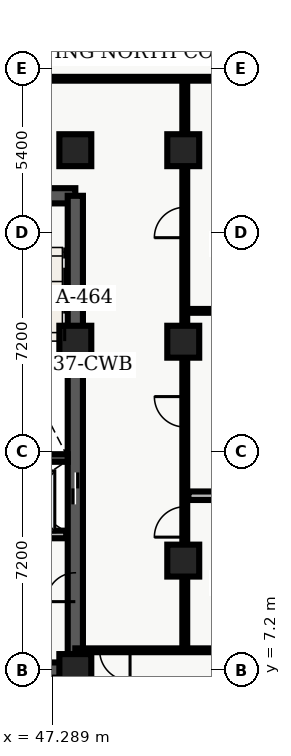
"""IFC4 building model, lengths in metres.
Left out: names, types, materials, properties, quantities, classifications, styles, units other than length and angle.
Written with IfcOpenShell. Run it as: python <this file> out.ifc"""

import sys

from ifc_helpers import new_model, entity, si_unit, converted_unit, direction, frame, origin_with_axes, origin_2d_with_axis, place, context, subcontext, project, spatial, polyline, rectangle, outline, extrude, element, fill, save


model = new_model("IFC4")
c1 = context("Model", 3, precision=1e-05, world=origin_with_axes(), true_north=direction((0.0, 1.0)))
c2 = subcontext(c1, "Body", "Model", "MODEL_VIEW")
j1 = project(units=[si_unit("LENGTHUNIT", "METRE"), converted_unit("PLANEANGLEUNIT", "DEGREE", entity("IfcPlaneAngleMeasure", 0.017), si_unit("PLANEANGLEUNIT", "RADIAN"), dimensions=[0, 0, 0, 0, 0, 0, 0])], contexts=[c1])
p1 = place(None, origin_with_axes())
s1 = spatial("IfcSite", under=j1, at=p1, CompositionType="ELEMENT")
p2 = place(p1, origin_with_axes())
s2 = spatial("IfcBuilding", under=s1, at=p2, CompositionType="ELEMENT")
p3 = place(p2, frame((0.0, 0.0, 152.4), z_axis=(0.0, 0.0, 1.0), x_axis=(1.0, 0.0, 0.0)))
s3 = spatial("IfcBuildingStorey", under=s2, at=p3, CompositionType="ELEMENT", Elevation=152.4)
p4 = place(p3, frame((40.2, 7.2, 0.0), z_axis=(0.0, 0.0, 1.0), x_axis=(1.0, 0.0, 0.0)))
e1 = element("IfcWall", 1, at=p4, inside=s3, PredefinedType="SHEAR", context=c2, shape_type="SweptSolid", body=[
    extrude(outline(polyline([(0.0, -0.25), (7.85, -0.25), (7.85, 0.25), (0.0, 0.25), (0.0, -0.25)])), origin_with_axes(), (0.0, 0.0, 1.0), 3.66),
])
p5 = place(p4, frame((2.175, 0.0, 0.0), z_axis=(0.0, 0.0, 1.0), x_axis=(1.0, 0.0, 0.0)))
e2 = element("IfcOpeningElement", 2, at=p5, cuts=e1, PredefinedType="OPENING", context=c2, shape_type="SweptSolid", body=[
    extrude(rectangle(XDim=1.05, YDim=0.52, at=origin_2d_with_axis()), origin_with_axes(), (0.0, 0.0, 1.0), 2.15),
])
p6 = place(p3, frame((40.2, 22.8, 0.0), z_axis=(0.0, 0.0, 1.0), x_axis=(1.0, 0.0, 0.0)))
e3 = element("IfcWall", 3, at=p6, inside=s3, PredefinedType="SHEAR", context=c2, shape_type="SweptSolid", body=[
    extrude(outline(polyline([(0.0, -0.25), (7.85, -0.25), (7.85, 0.25), (0.0, 0.25), (0.0, -0.25)])), origin_with_axes(), (0.0, 0.0, 1.0), 3.66),
])
p7 = place(p6, frame((5.775, 0.0, 0.0), z_axis=(0.0, 0.0, 1.0), x_axis=(1.0, 0.0, 0.0)))
e4 = element("IfcOpeningElement", 4, at=p7, cuts=e3, PredefinedType="OPENING", context=c2, shape_type="SweptSolid", body=[
    extrude(rectangle(XDim=1.05, YDim=0.52, at=origin_2d_with_axis()), origin_with_axes(), (0.0, 0.0, 1.0), 2.15),
])
p8 = place(p3, frame((48.05, 7.2, 0.0), z_axis=(0.0, 0.0, 1.0), x_axis=(0.0, 1.0, 0.0)))
e5 = element("IfcWall", 5, at=p8, inside=s3, PredefinedType="SHEAR", context=c2, shape_type="SweptSolid", body=[
    extrude(outline(polyline([(0.0, -0.25), (15.6, -0.25), (15.6, 0.25), (0.0, 0.25), (0.0, -0.25)])), origin_with_axes(), (0.0, 0.0, 1.0), 3.66),
])
p9 = place(p8, frame((5.975, 0.0, 0.0), z_axis=(0.0, 0.0, 1.0), x_axis=(1.0, 0.0, 0.0)))
e6 = element("IfcOpeningElement", 6, at=p9, cuts=e5, PredefinedType="OPENING", context=c2, shape_type="SweptSolid", body=[
    extrude(rectangle(XDim=1.05, YDim=0.52, at=origin_2d_with_axis()), origin_with_axes(), (0.0, 0.0, 1.0), 2.15),
])
p10 = place(p8, frame((2.725, 0.0, 0.0), z_axis=(0.0, 0.0, 1.0), x_axis=(1.0, 0.0, 0.0)))
e7 = element("IfcOpeningElement", 7, at=p10, cuts=e5, PredefinedType="OPENING", context=c2, shape_type="SweptSolid", body=[
    extrude(rectangle(XDim=0.95, YDim=0.52, at=origin_2d_with_axis()), origin_with_axes(), (0.0, 0.0, 1.0), 2.15),
])
p11 = place(p3, frame((44.25, 14.175, 0.0), z_axis=(0.0, 0.0, 1.0), x_axis=(1.0, 0.0, 0.0)))
e8 = element("IfcWall", 8, at=p11, inside=s3, PredefinedType="SHEAR", context=c2, shape_type="SweptSolid", body=[
    extrude(outline(polyline([(0.0, -0.125), (3.55, -0.125), (3.55, 0.125), (0.0, 0.125), (0.0, -0.125)])), origin_with_axes(), (0.0, 0.0, 1.0), 3.66),
])
for number, where, z_axis, x_axis in (
    (9, (48.05, 7.2, 0.0), (0.0, 0.0, 1.0), (1.0, 0.0, 0.0)),
    (10, (48.05, 18.0, 0.0), (0.0, 0.0, 1.0), (1.0, 0.0, 0.0)),
    (11, (48.05, 24.3, 0.0), (0.0, 0.0, 1.0), (1.0, 0.0, 0.0)),
    (12, (51.6, 10.8, 0.0), (0.0, 0.0, 1.0), (1.0, 0.0, 0.0)),
    (13, (51.6, 18.0, 0.0), (0.0, 0.0, 1.0), (1.0, 0.0, 0.0)),
    (14, (51.6, 24.3, 0.0), (0.0, 0.0, 1.0), (1.0, 0.0, 0.0)),
):
    element("IfcColumn", number, at=place(p3, frame(where, z_axis=z_axis, x_axis=x_axis)), inside=s3, PredefinedType="COLUMN", context=c2, shape_type="SweptSolid", body=[
        extrude(rectangle(XDim=1.05, YDim=1.05, at=origin_2d_with_axis()), origin_with_axes(), (0.0, 0.0, 1.0), 3.9),
    ])
p12 = place(p3, frame((44.25, 11.66, 0.0), z_axis=(0.0, 0.0, 1.0), x_axis=(1.0, 0.0, 0.0)))
e15 = element("IfcWall", 15, at=p12, inside=s3, PredefinedType="SOLIDWALL", context=c2, shape_type="SweptSolid", body=[
    extrude(outline(polyline([(0.0, -0.125), (3.5, -0.125), (3.5, 0.125), (0.0, 0.125), (0.0, -0.125)])), origin_with_axes(), (0.0, 0.0, 1.0), 2.7),
])
p13 = place(p3, frame((51.65, 7.85, 0.0), z_axis=(0.0, 0.0, 1.0), x_axis=(0.0, 1.0, 0.0)))
e16 = element("IfcWall", 16, at=p13, inside=s3, PredefinedType="PARTITIONING", context=c2, shape_type="SweptSolid", body=[
    extrude(outline(polyline([(0.0, -0.08), (18.8, -0.08), (18.8, 0.08), (0.0, 0.08), (0.0, -0.08)])), origin_with_axes(), (0.0, 0.0, 1.0), 2.7),
])
p14 = place(p13, frame((4.222, 0.0, 0.0), z_axis=(0.0, 0.0, 1.0), x_axis=(1.0, 0.0, 0.0)))
e17 = element("IfcOpeningElement", 17, at=p14, cuts=e16, PredefinedType="OPENING", context=c2, shape_type="SweptSolid", body=[
    extrude(rectangle(XDim=1.0, YDim=0.18, at=origin_2d_with_axis()), origin_with_axes(), (0.0, 0.0, 1.0), 2.15),
])
p15 = place(p13, frame((7.845, 0.0, 0.0), z_axis=(0.0, 0.0, 1.0), x_axis=(1.0, 0.0, 0.0)))
e18 = element("IfcOpeningElement", 18, at=p15, cuts=e16, PredefinedType="OPENING", context=c2, shape_type="SweptSolid", body=[
    extrude(rectangle(XDim=1.0, YDim=0.18, at=origin_2d_with_axis()), origin_with_axes(), (0.0, 0.0, 1.0), 2.15),
])
p16 = place(p13, frame((14.072, 0.0, 0.0), z_axis=(0.0, 0.0, 1.0), x_axis=(1.0, 0.0, 0.0)))
e19 = element("IfcOpeningElement", 19, at=p16, cuts=e16, PredefinedType="OPENING", context=c2, shape_type="SweptSolid", body=[
    extrude(rectangle(XDim=1.0, YDim=0.18, at=origin_2d_with_axis()), origin_with_axes(), (0.0, 0.0, 1.0), 2.15),
])
p17 = place(p3, frame((59.665, 7.85, 0.0), z_axis=(0.0, 0.0, 1.0), x_axis=(-1.0, 0.0, 0.0)))
e20 = element("IfcWall", 20, at=p17, inside=s3, PredefinedType="PARTITIONING", context=c2, shape_type="SweptSolid", body=[
    extrude(outline(polyline([(0.0, -0.062), (11.615, -0.062), (11.615, 0.062), (0.0, 0.062), (0.0, -0.062)])), origin_with_axes(), (0.0, 0.0, 1.0), 2.7),
])
p18 = place(p17, frame((10.315, 0.0, 0.0), z_axis=(0.0, 0.0, 1.0), x_axis=(1.0, 0.0, 0.0)))
e21 = element("IfcOpeningElement", 21, at=p18, cuts=e20, PredefinedType="OPENING", context=c2, shape_type="SweptSolid", body=[
    extrude(rectangle(XDim=1.0, YDim=0.145, at=origin_2d_with_axis()), origin_with_axes(), (0.0, 0.0, 1.0), 2.15),
])
p19 = place(p3, frame((38.735, 26.65, 0.0), z_axis=(0.0, 0.0, 1.0), x_axis=(1.0, 0.0, 0.0)))
e22 = element("IfcWall", 22, at=p19, inside=s3, PredefinedType="PARTITIONING", context=c2, shape_type="SweptSolid", body=[
    extrude(outline(polyline([(0.0, -0.062), (20.905, -0.062), (20.905, 0.062), (0.0, 0.062), (0.0, -0.062)])), origin_with_axes(), (0.0, 0.0, 1.0), 2.7),
])
p20 = place(p19, frame((4.265, 0.0, 0.0), z_axis=(0.0, 0.0, 1.0), x_axis=(1.0, 0.0, 0.0)))
e23 = element("IfcOpeningElement", 23, at=p20, cuts=e22, PredefinedType="OPENING", context=c2, shape_type="SweptSolid", body=[
    extrude(rectangle(XDim=1.0, YDim=0.145, at=origin_2d_with_axis()), origin_with_axes(), (0.0, 0.0, 1.0), 2.15),
])
p21 = place(p3, frame((51.77, 12.934, 0.0), z_axis=(0.0, 0.0, 1.0), x_axis=(1.0, 0.0, 0.0)))
e24 = element("IfcWall", 24, at=p21, inside=s3, PredefinedType="PARTITIONING", context=c2, shape_type="SweptSolid", body=[
    extrude(outline(polyline([(0.0, -0.14), (7.895, -0.14), (7.895, 0.14), (0.0, 0.14), (0.0, -0.14)])), origin_with_axes(), (0.0, 0.0, 1.0), 2.7),
])
p22 = place(p3, frame((51.77, 19.015, 0.0), z_axis=(0.0, 0.0, 1.0), x_axis=(1.0, 0.0, 0.0)))
e25 = element("IfcWall", 25, at=p22, inside=s3, PredefinedType="PARTITIONING", context=c2, shape_type="SweptSolid", body=[
    extrude(outline(polyline([(0.0, -0.062), (7.895, -0.062), (7.895, 0.062), (0.0, 0.062), (0.0, -0.062)])), origin_with_axes(), (0.0, 0.0, 1.0), 2.7),
])
p23 = place(p8, frame((5.975, 0.0, 0.0), z_axis=(0.0, 0.0, 1.0), x_axis=(1.0, 0.0, 0.0)))
e26 = element("IfcDoor", 26, at=p23, inside=s3, OperationType="SLIDING_TO_LEFT", PredefinedType="DOOR", context=c2, shape_type="SweptSolid", body=[
    extrude(rectangle(XDim=1.05, YDim=0.09, at=origin_2d_with_axis()), origin_with_axes(), (0.0, 0.0, 1.0), 2.15),
])
fill(e6, e26)
p24 = place(p8, frame((2.725, 0.0, 0.0), z_axis=(0.0, 0.0, 1.0), x_axis=(1.0, 0.0, 0.0)))
e27 = element("IfcDoor", 27, at=p24, inside=s3, OperationType="SINGLE_SWING_LEFT", PredefinedType="DOOR", context=c2, shape_type="SweptSolid", body=[
    extrude(rectangle(XDim=0.95, YDim=0.09, at=origin_2d_with_axis()), origin_with_axes(), (0.0, 0.0, 1.0), 2.15),
])
fill(e7, e27)
p25 = place(p17, frame((10.315, 0.0, 0.0), z_axis=(0.0, 0.0, 1.0), x_axis=(1.0, 0.0, 0.0)))
e28 = element("IfcDoor", 28, at=p25, inside=s3, OperationType="SINGLE_SWING_LEFT", PredefinedType="DOOR", context=c2, shape_type="SweptSolid", body=[
    extrude(rectangle(XDim=1.0, YDim=0.075, at=origin_2d_with_axis()), origin_with_axes(), (0.0, 0.0, 1.0), 2.15),
])
fill(e21, e28)
p26 = place(p13, frame((4.222, 0.0, 0.0), z_axis=(0.0, 0.0, 1.0), x_axis=(1.0, 0.0, 0.0)))
e29 = element("IfcDoor", 29, at=p26, inside=s3, OperationType="SINGLE_SWING_LEFT", PredefinedType="DOOR", context=c2, shape_type="SweptSolid", body=[
    extrude(rectangle(XDim=1.0, YDim=0.09, at=origin_2d_with_axis()), origin_with_axes(), (0.0, 0.0, 1.0), 2.15),
])
fill(e17, e29)
p27 = place(p13, frame((7.845, 0.0, 0.0), z_axis=(0.0, 0.0, 1.0), x_axis=(1.0, 0.0, 0.0)))
e30 = element("IfcDoor", 30, at=p27, inside=s3, OperationType="SINGLE_SWING_RIGHT", PredefinedType="DOOR", context=c2, shape_type="SweptSolid", body=[
    extrude(rectangle(XDim=1.0, YDim=0.09, at=origin_2d_with_axis()), origin_with_axes(), (0.0, 0.0, 1.0), 2.15),
])
fill(e18, e30)
p28 = place(p13, frame((14.072, 0.0, 0.0), z_axis=(0.0, 0.0, 1.0), x_axis=(1.0, 0.0, 0.0)))
e31 = element("IfcDoor", 31, at=p28, inside=s3, OperationType="SINGLE_SWING_LEFT", PredefinedType="DOOR", context=c2, shape_type="SweptSolid", body=[
    extrude(rectangle(XDim=1.0, YDim=0.09, at=origin_2d_with_axis()), origin_with_axes(), (0.0, 0.0, 1.0), 2.15),
])
fill(e19, e31)
save(model, sys.argv[1])
